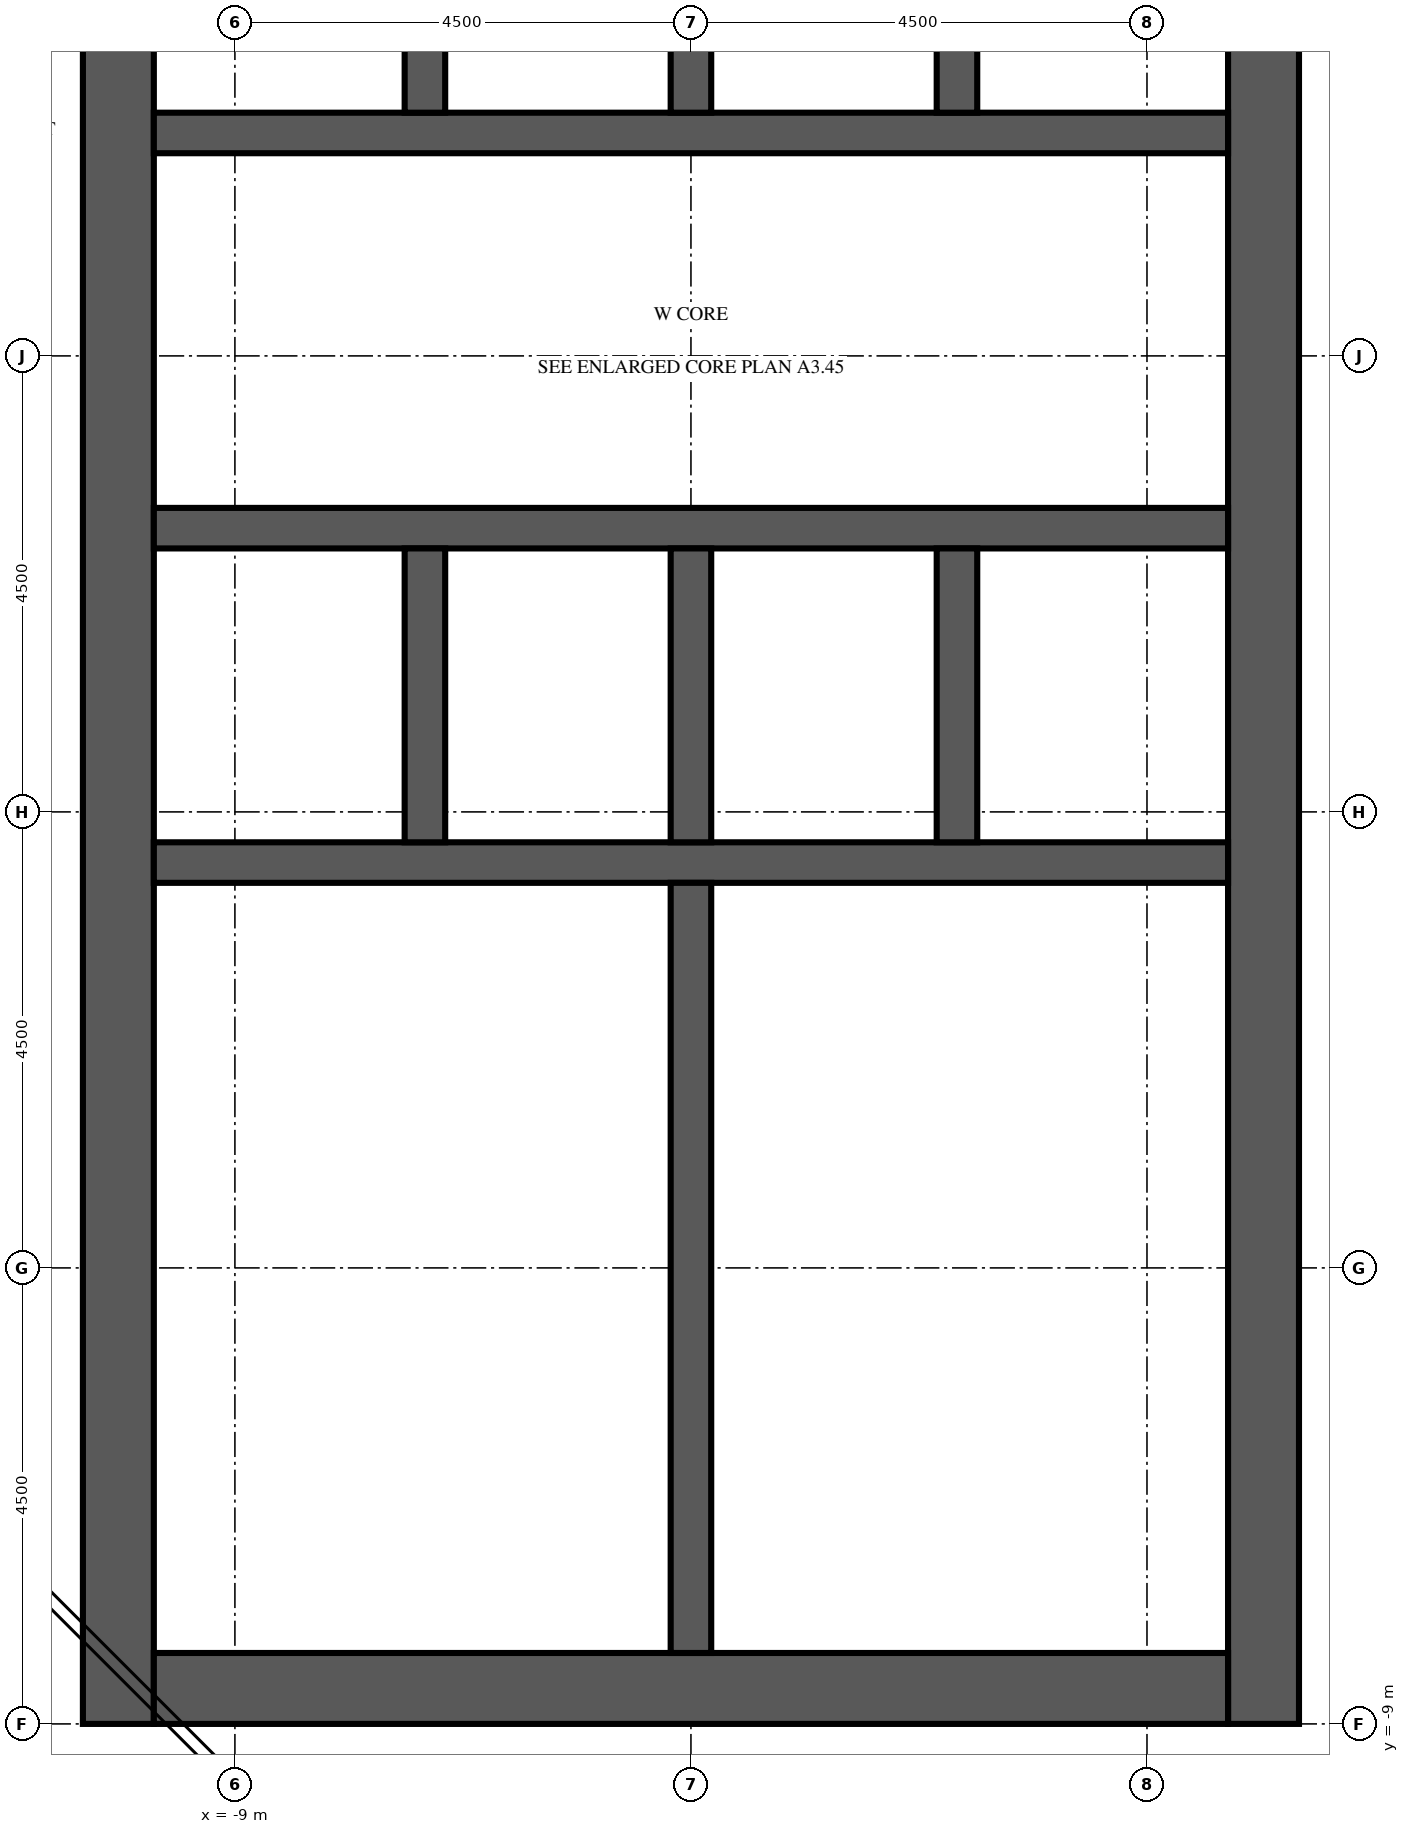
"""IFC4 building model, lengths in metres.
Left out: names, types, materials, properties, quantities, classifications, styles, units other than length and angle.
Written with IfcOpenShell. Run it as: python <this file> out.ifc"""

import sys

from ifc_helpers import new_model, si_unit, direction, frame, frame_2d, origin, place, context, subcontext, project, spatial, rectangle, extrude, element, fill, save


model = new_model("IFC4")
c1 = context("Model", 3, precision=1e-05, world=origin(), true_north=direction((0.0, 1.0)))
c2 = subcontext(c1, "Body", "Model", "MODEL_VIEW")
j1 = project(units=[si_unit("LENGTHUNIT", "METRE"), si_unit("PLANEANGLEUNIT", "RADIAN")], contexts=[c1])
p1 = place(None, origin())
s1 = spatial("IfcSite", under=j1, at=p1, CompositionType="ELEMENT")
p2 = place(p1, origin())
s2 = spatial("IfcBuilding", under=s1, at=p2, CompositionType="ELEMENT")
p3 = place(p2, frame((0.0, 0.0, 311.8)))
s3 = spatial("IfcBuildingStorey", under=s2, at=p3, CompositionType="ELEMENT", Elevation=311.8)
p4 = place(p3, frame((-10.15, -9.0, 0.0), z_axis=(0.0, 0.0, 1.0), x_axis=(0.0, 1.0, 0.0)))
e1 = element("IfcWall", 1, at=p4, inside=s3, PredefinedType="SHEAR", context=c2, shape_type="SweptSolid", body=[
    extrude(rectangle(XDim=27.5, YDim=0.7, at=frame_2d((13.75, 0.0))), origin(), (0.0, 0.0, 1.0), 4.8),
])
p5 = place(p4, frame((12.55, 0.0, 0.0)))
e2 = element("IfcOpeningElement", 2, at=p5, cuts=e1, PredefinedType="OPENING", context=c2, shape_type="SweptSolid", body=[
    extrude(rectangle(XDim=2.4, YDim=2.4, at=frame_2d((1.2, 1.2))), frame((0.0, 0.36, 0.0), z_axis=(0.0, -1.0, 0.0), x_axis=(1.0, 0.0, 0.0)), (0.0, 0.0, 1.0), 0.72),
])
p6 = place(p4, frame((6.825, 0.0, 0.0)))
e3 = element("IfcOpeningElement", 3, at=p6, cuts=e1, PredefinedType="OPENING", context=c2, shape_type="SweptSolid", body=[
    extrude(rectangle(XDim=1.2, YDim=2.1, at=frame_2d((0.6, 1.05))), frame((0.0, 0.36, 0.0), z_axis=(0.0, -1.0, 0.0), x_axis=(1.0, 0.0, 0.0)), (0.0, 0.0, 1.0), 0.72),
])
p7 = place(p4, frame((19.475, 0.0, 0.0)))
e4 = element("IfcOpeningElement", 4, at=p7, cuts=e1, PredefinedType="OPENING", context=c2, shape_type="SweptSolid", body=[
    extrude(rectangle(XDim=1.2, YDim=2.1, at=frame_2d((0.6, 1.05))), frame((0.0, 0.36, 0.0), z_axis=(0.0, -1.0, 0.0), x_axis=(1.0, 0.0, 0.0)), (0.0, 0.0, 1.0), 0.72),
])
p8 = place(p3, frame((1.15, -9.0, 0.0), z_axis=(0.0, 0.0, 1.0), x_axis=(0.0, 1.0, 0.0)))
e5 = element("IfcWall", 5, at=p8, inside=s3, PredefinedType="SHEAR", context=c2, shape_type="SweptSolid", body=[
    extrude(rectangle(XDim=27.5, YDim=0.7, at=frame_2d((13.75, 0.0))), origin(), (0.0, 0.0, 1.0), 4.8),
])
p9 = place(p8, frame((12.55, 0.0, 0.0)))
e6 = element("IfcOpeningElement", 6, at=p9, cuts=e5, PredefinedType="OPENING", context=c2, shape_type="SweptSolid", body=[
    extrude(rectangle(XDim=2.4, YDim=2.4, at=frame_2d((1.2, 1.2))), frame((0.0, 0.36, 0.0), z_axis=(0.0, -1.0, 0.0), x_axis=(1.0, 0.0, 0.0)), (0.0, 0.0, 1.0), 0.72),
])
p10 = place(p8, frame((5.42, 0.0, 0.0)))
e7 = element("IfcOpeningElement", 7, at=p10, cuts=e5, PredefinedType="OPENING", context=c2, shape_type="SweptSolid", body=[
    extrude(rectangle(XDim=1.2, YDim=2.1, at=frame_2d((0.6, 1.05))), frame((0.0, 0.36, 0.0), z_axis=(0.0, -1.0, 0.0), x_axis=(1.0, 0.0, 0.0)), (0.0, 0.0, 1.0), 0.72),
])
p11 = place(p8, frame((19.46, 0.0, 0.0)))
e8 = element("IfcOpeningElement", 8, at=p11, cuts=e5, PredefinedType="OPENING", context=c2, shape_type="SweptSolid", body=[
    extrude(rectangle(XDim=1.0, YDim=2.1, at=frame_2d((0.5, 1.05))), frame((0.0, 0.36, 0.0), z_axis=(0.0, -1.0, 0.0), x_axis=(1.0, 0.0, 0.0)), (0.0, 0.0, 1.0), 0.72),
])
p12 = place(p8, frame((21.17, 0.0, 0.0)))
e9 = element("IfcOpeningElement", 9, at=p12, cuts=e5, PredefinedType="OPENING", context=c2, shape_type="SweptSolid", body=[
    extrude(rectangle(XDim=1.0, YDim=2.1, at=frame_2d((0.5, 1.05))), frame((0.0, 0.36, 0.0), z_axis=(0.0, -1.0, 0.0), x_axis=(1.0, 0.0, 0.0)), (0.0, 0.0, 1.0), 0.72),
])
p13 = place(p8, frame((23.26, 0.0, 0.0)))
e10 = element("IfcOpeningElement", 10, at=p13, cuts=e5, PredefinedType="OPENING", context=c2, shape_type="SweptSolid", body=[
    extrude(rectangle(XDim=1.0, YDim=2.1, at=frame_2d((0.5, 1.05))), frame((0.0, 0.36, 0.0), z_axis=(0.0, -1.0, 0.0), x_axis=(1.0, 0.0, 0.0)), (0.0, 0.0, 1.0), 0.72),
])
p14 = place(p8, frame((25.35, 0.0, 0.0)))
e11 = element("IfcOpeningElement", 11, at=p14, cuts=e5, PredefinedType="OPENING", context=c2, shape_type="SweptSolid", body=[
    extrude(rectangle(XDim=1.0, YDim=2.1, at=frame_2d((0.5, 1.05))), frame((0.0, 0.36, 0.0), z_axis=(0.0, -1.0, 0.0), x_axis=(1.0, 0.0, 0.0)), (0.0, 0.0, 1.0), 0.72),
])
p15 = place(p3, frame((-9.8, -8.65, 0.0), z_axis=(0.0, 0.0, 1.0), x_axis=(1.0, 0.0, 0.0)))
e12 = element("IfcWall", 12, at=p15, inside=s3, PredefinedType="SHEAR", context=c2, shape_type="SweptSolid", body=[
    extrude(rectangle(XDim=10.6, YDim=0.7, at=frame_2d((5.3, 0.0))), origin(), (0.0, 0.0, 1.0), 4.8),
])
p16 = place(p3, frame((-9.8, -0.5, 0.0), z_axis=(0.0, 0.0, 1.0), x_axis=(1.0, 0.0, 0.0)))
e13 = element("IfcWall", 13, at=p16, inside=s3, PredefinedType="SHEAR", context=c2, shape_type="SweptSolid", body=[
    extrude(rectangle(XDim=10.6, YDim=0.4, at=frame_2d((5.3, 0.0))), origin(), (0.0, 0.0, 1.0), 4.8),
])
p17 = place(p3, frame((-9.8, 2.8, 0.0), z_axis=(0.0, 0.0, 1.0), x_axis=(1.0, 0.0, 0.0)))
e14 = element("IfcWall", 14, at=p17, inside=s3, PredefinedType="SHEAR", context=c2, shape_type="SweptSolid", body=[
    extrude(rectangle(XDim=10.6, YDim=0.4, at=frame_2d((5.3, 0.0))), origin(), (0.0, 0.0, 1.0), 4.8),
])
p18 = place(p17, frame((0.688, 0.0, 0.0)))
e15 = element("IfcOpeningElement", 15, at=p18, cuts=e14, PredefinedType="OPENING", context=c2, shape_type="SweptSolid", body=[
    extrude(rectangle(XDim=1.1, YDim=2.1, at=frame_2d((0.55, 1.05))), frame((0.0, 0.21, 0.0), z_axis=(0.0, -1.0, 0.0), x_axis=(1.0, 0.0, 0.0)), (0.0, 0.0, 1.0), 0.42),
])
p19 = place(p17, frame((3.438, 0.0, 0.0)))
e16 = element("IfcOpeningElement", 16, at=p19, cuts=e14, PredefinedType="OPENING", context=c2, shape_type="SweptSolid", body=[
    extrude(rectangle(XDim=1.1, YDim=2.1, at=frame_2d((0.55, 1.05))), frame((0.0, 0.21, 0.0), z_axis=(0.0, -1.0, 0.0), x_axis=(1.0, 0.0, 0.0)), (0.0, 0.0, 1.0), 0.42),
])
p20 = place(p17, frame((6.113, 0.0, 0.0)))
e17 = element("IfcOpeningElement", 17, at=p20, cuts=e14, PredefinedType="OPENING", context=c2, shape_type="SweptSolid", body=[
    extrude(rectangle(XDim=1.0, YDim=2.1, at=frame_2d((0.5, 1.05))), frame((0.0, 0.21, 0.0), z_axis=(0.0, -1.0, 0.0), x_axis=(1.0, 0.0, 0.0)), (0.0, 0.0, 1.0), 0.42),
])
p21 = place(p17, frame((8.863, 0.0, 0.0)))
e18 = element("IfcOpeningElement", 18, at=p21, cuts=e14, PredefinedType="OPENING", context=c2, shape_type="SweptSolid", body=[
    extrude(rectangle(XDim=1.0, YDim=2.1, at=frame_2d((0.5, 1.05))), frame((0.0, 0.21, 0.0), z_axis=(0.0, -1.0, 0.0), x_axis=(1.0, 0.0, 0.0)), (0.0, 0.0, 1.0), 0.42),
])
p22 = place(p3, frame((-9.8, 6.7, 0.0), z_axis=(0.0, 0.0, 1.0), x_axis=(1.0, 0.0, 0.0)))
e19 = element("IfcWall", 19, at=p22, inside=s3, PredefinedType="SHEAR", context=c2, shape_type="SweptSolid", body=[
    extrude(rectangle(XDim=10.6, YDim=0.4, at=frame_2d((5.3, 0.0))), origin(), (0.0, 0.0, 1.0), 4.8),
])
p23 = place(p22, frame((0.738, 0.0, 0.0)))
e20 = element("IfcOpeningElement", 20, at=p23, cuts=e19, PredefinedType="OPENING", context=c2, shape_type="SweptSolid", body=[
    extrude(rectangle(XDim=1.0, YDim=2.1, at=frame_2d((0.5, 1.05))), frame((0.0, 0.21, 0.0), z_axis=(0.0, -1.0, 0.0), x_axis=(1.0, 0.0, 0.0)), (0.0, 0.0, 1.0), 0.42),
])
p24 = place(p22, frame((3.488, 0.0, 0.0)))
e21 = element("IfcOpeningElement", 21, at=p24, cuts=e19, PredefinedType="OPENING", context=c2, shape_type="SweptSolid", body=[
    extrude(rectangle(XDim=1.0, YDim=2.1, at=frame_2d((0.5, 1.05))), frame((0.0, 0.21, 0.0), z_axis=(0.0, -1.0, 0.0), x_axis=(1.0, 0.0, 0.0)), (0.0, 0.0, 1.0), 0.42),
])
p25 = place(p22, frame((6.113, 0.0, 0.0)))
e22 = element("IfcOpeningElement", 22, at=p25, cuts=e19, PredefinedType="OPENING", context=c2, shape_type="SweptSolid", body=[
    extrude(rectangle(XDim=1.0, YDim=2.1, at=frame_2d((0.5, 1.05))), frame((0.0, 0.21, 0.0), z_axis=(0.0, -1.0, 0.0), x_axis=(1.0, 0.0, 0.0)), (0.0, 0.0, 1.0), 0.42),
])
p26 = place(p22, frame((8.863, 0.0, 0.0)))
e23 = element("IfcOpeningElement", 23, at=p26, cuts=e19, PredefinedType="OPENING", context=c2, shape_type="SweptSolid", body=[
    extrude(rectangle(XDim=1.0, YDim=2.1, at=frame_2d((0.5, 1.05))), frame((0.0, 0.21, 0.0), z_axis=(0.0, -1.0, 0.0), x_axis=(1.0, 0.0, 0.0)), (0.0, 0.0, 1.0), 0.42),
])
for number, where, z_axis, x_axis in (
    (24, (-7.125, -0.3, 0.0), (0.0, 0.0, 1.0), (0.0, 1.0, 0.0)),
    (25, (-7.125, 6.9, 0.0), (0.0, 0.0, 1.0), (0.0, 1.0, 0.0)),
    (26, (-4.5, -0.3, 0.0), (0.0, 0.0, 1.0), (0.0, 1.0, 0.0)),
    (27, (-4.5, 6.9, 0.0), (0.0, 0.0, 1.0), (0.0, 1.0, 0.0)),
    (28, (-1.875, -0.3, 0.0), (0.0, 0.0, 1.0), (0.0, 1.0, 0.0)),
    (29, (-1.875, 6.9, 0.0), (0.0, 0.0, 1.0), (0.0, 1.0, 0.0)),
):
    element("IfcWall", number, at=place(p3, frame(where, z_axis=z_axis, x_axis=x_axis)), inside=s3, PredefinedType="SHEAR", context=c2, shape_type="SweptSolid", body=[
        extrude(rectangle(XDim=2.9, YDim=0.4, at=frame_2d((1.45, 0.0))), origin(), (0.0, 0.0, 1.0), 4.8),
    ])
p27 = place(p3, frame((-4.5, -8.3, 0.0), z_axis=(0.0, 0.0, 1.0), x_axis=(0.0, 1.0, 0.0)))
e30 = element("IfcWall", 30, at=p27, inside=s3, PredefinedType="SHEAR", context=c2, shape_type="SweptSolid", body=[
    extrude(rectangle(XDim=7.6, YDim=0.4, at=frame_2d((3.8, 0.0))), origin(), (0.0, 0.0, 1.0), 4.8),
])
p28 = place(p3, frame((-0.7, -5.26, 0.0), z_axis=(0.0, 0.0, 1.0), x_axis=(1.0, 0.0, 0.0)))
e31 = element("IfcWall", 31, at=p28, inside=s3, PredefinedType="PARTITIONING", context=c2, shape_type="SweptSolid", body=[
    extrude(rectangle(XDim=1.5, YDim=0.1, at=frame_2d((0.75, 0.0))), origin(), (0.0, 0.0, 1.0), 4.2),
])
p29 = place(p28, frame((0.25, 0.0, 0.0)))
e32 = element("IfcOpeningElement", 32, at=p29, cuts=e31, PredefinedType="OPENING", context=c2, shape_type="SweptSolid", body=[
    extrude(rectangle(XDim=1.0, YDim=2.1, at=frame_2d((0.5, 1.05))), frame((0.0, 0.06, 0.0), z_axis=(0.0, -1.0, 0.0), x_axis=(1.0, 0.0, 0.0)), (0.0, 0.0, 1.0), 0.12),
])
p30 = place(p3, frame((-0.7, -5.26, 0.0), z_axis=(0.0, 0.0, 1.0), x_axis=(0.0, 1.0, 0.0)))
e33 = element("IfcWall", 33, at=p30, inside=s3, PredefinedType="PARTITIONING", context=c2, shape_type="SweptSolid", body=[
    extrude(rectangle(XDim=2.28, YDim=0.1, at=frame_2d((1.14, 0.0))), origin(), (0.0, 0.0, 1.0), 4.2),
])
p31 = place(p30, frame((0.64, 0.0, 0.0)))
e34 = element("IfcOpeningElement", 34, at=p31, cuts=e33, PredefinedType="OPENING", context=c2, shape_type="SweptSolid", body=[
    extrude(rectangle(XDim=1.0, YDim=2.1, at=frame_2d((0.5, 1.05))), frame((0.0, 0.06, 0.0), z_axis=(0.0, -1.0, 0.0), x_axis=(1.0, 0.0, 0.0)), (0.0, 0.0, 1.0), 0.12),
])
p32 = place(p3, frame((-0.7, -2.98, 0.0), z_axis=(0.0, 0.0, 1.0), x_axis=(0.0, 1.0, 0.0)))
e35 = element("IfcWall", 35, at=p32, inside=s3, PredefinedType="PARTITIONING", context=c2, shape_type="SweptSolid", body=[
    extrude(rectangle(XDim=2.28, YDim=0.1, at=frame_2d((1.14, 0.0))), origin(), (0.0, 0.0, 1.0), 4.2),
])
p33 = place(p32, frame((0.64, 0.0, 0.0)))
e36 = element("IfcOpeningElement", 36, at=p33, cuts=e35, PredefinedType="OPENING", context=c2, shape_type="SweptSolid", body=[
    extrude(rectangle(XDim=1.0, YDim=2.1, at=frame_2d((0.5, 1.05))), frame((0.0, 0.06, 0.0), z_axis=(0.0, -1.0, 0.0), x_axis=(1.0, 0.0, 0.0)), (0.0, 0.0, 1.0), 0.12),
])
for number, where, z_axis, x_axis in (
    (37, (-4.3, -5.26, 0.0), (0.0, 0.0, 1.0), (1.0, 0.0, 0.0)),
    (38, (-4.3, -2.98, 0.0), (0.0, 0.0, 1.0), (1.0, 0.0, 0.0)),
):
    element("IfcWall", number, at=place(p3, frame(where, z_axis=z_axis, x_axis=x_axis)), inside=s3, PredefinedType="PARTITIONING", context=c2, shape_type="SweptSolid", body=[
        extrude(rectangle(XDim=3.6, YDim=0.1, at=frame_2d((1.8, 0.0))), origin(), (0.0, 0.0, 1.0), 4.2),
    ])
p34 = place(p18, origin())
e39 = element("IfcDoor", 39, at=p34, inside=s3, OperationType="DOUBLE_DOOR_SLIDING", PredefinedType="DOOR", context=c2, shape_type="SweptSolid", body=[
    extrude(rectangle(XDim=1.1, YDim=2.1, at=frame_2d((0.55, 1.05))), frame((0.0, 0.025, 0.0), z_axis=(0.0, -1.0, 0.0), x_axis=(1.0, 0.0, 0.0)), (0.0, 0.0, 1.0), 0.05),
])
fill(e15, e39)
p35 = place(p19, origin())
e40 = element("IfcDoor", 40, at=p35, inside=s3, OperationType="DOUBLE_DOOR_SLIDING", PredefinedType="DOOR", context=c2, shape_type="SweptSolid", body=[
    extrude(rectangle(XDim=1.1, YDim=2.1, at=frame_2d((0.55, 1.05))), frame((0.0, 0.025, 0.0), z_axis=(0.0, -1.0, 0.0), x_axis=(1.0, 0.0, 0.0)), (0.0, 0.0, 1.0), 0.05),
])
fill(e16, e40)
p36 = place(p5, origin())
e41 = element("IfcDoor", 41, at=p36, inside=s3, OperationType="DOUBLE_DOOR_DOUBLE_SWING", PredefinedType="DOOR", context=c2, shape_type="SweptSolid", body=[
    extrude(rectangle(XDim=2.4, YDim=2.4, at=frame_2d((1.2, 1.2))), frame((0.0, 0.025, 0.0), z_axis=(0.0, -1.0, 0.0), x_axis=(1.0, 0.0, 0.0)), (0.0, 0.0, 1.0), 0.05),
])
fill(e2, e41)
p37 = place(p9, origin())
e42 = element("IfcDoor", 42, at=p37, inside=s3, OperationType="DOUBLE_DOOR_DOUBLE_SWING", PredefinedType="DOOR", context=c2, shape_type="SweptSolid", body=[
    extrude(rectangle(XDim=2.4, YDim=2.4, at=frame_2d((1.2, 1.2))), frame((0.0, 0.025, 0.0), z_axis=(0.0, -1.0, 0.0), x_axis=(1.0, 0.0, 0.0)), (0.0, 0.0, 1.0), 0.05),
])
fill(e6, e42)
p38 = place(p6, origin())
e43 = element("IfcDoor", 43, at=p38, inside=s3, OperationType="SINGLE_SWING_LEFT", PredefinedType="DOOR", context=c2, shape_type="SweptSolid", body=[
    extrude(rectangle(XDim=1.2, YDim=2.1, at=frame_2d((0.6, 1.05))), frame((0.0, 0.025, 0.0), z_axis=(0.0, -1.0, 0.0), x_axis=(1.0, 0.0, 0.0)), (0.0, 0.0, 1.0), 0.05),
])
fill(e3, e43)
p39 = place(p20, origin())
e44 = element("IfcDoor", 44, at=p39, inside=s3, OperationType="SINGLE_SWING_LEFT", PredefinedType="DOOR", context=c2, shape_type="SweptSolid", body=[
    extrude(rectangle(XDim=1.0, YDim=2.1, at=frame_2d((0.5, 1.05))), frame((0.0, 0.025, 0.0), z_axis=(0.0, -1.0, 0.0), x_axis=(1.0, 0.0, 0.0)), (0.0, 0.0, 1.0), 0.05),
])
fill(e17, e44)
p40 = place(p21, origin())
e45 = element("IfcDoor", 45, at=p40, inside=s3, OperationType="SINGLE_SWING_RIGHT", PredefinedType="DOOR", context=c2, shape_type="SweptSolid", body=[
    extrude(rectangle(XDim=1.0, YDim=2.1, at=frame_2d((0.5, 1.05))), frame((0.0, 0.025, 0.0), z_axis=(0.0, -1.0, 0.0), x_axis=(1.0, 0.0, 0.0)), (0.0, 0.0, 1.0), 0.05),
])
fill(e18, e45)
p41 = place(p23, origin())
e46 = element("IfcDoor", 46, at=p41, inside=s3, OperationType="SINGLE_SWING_LEFT", PredefinedType="DOOR", context=c2, shape_type="SweptSolid", body=[
    extrude(rectangle(XDim=1.0, YDim=2.1, at=frame_2d((0.5, 1.05))), frame((0.0, 0.025, 0.0), z_axis=(0.0, -1.0, 0.0), x_axis=(1.0, 0.0, 0.0)), (0.0, 0.0, 1.0), 0.05),
])
fill(e20, e46)
p42 = place(p24, origin())
e47 = element("IfcDoor", 47, at=p42, inside=s3, OperationType="SINGLE_SWING_RIGHT", PredefinedType="DOOR", context=c2, shape_type="SweptSolid", body=[
    extrude(rectangle(XDim=1.0, YDim=2.1, at=frame_2d((0.5, 1.05))), frame((0.0, 0.025, 0.0), z_axis=(0.0, -1.0, 0.0), x_axis=(1.0, 0.0, 0.0)), (0.0, 0.0, 1.0), 0.05),
])
fill(e21, e47)
p43 = place(p25, origin())
e48 = element("IfcDoor", 48, at=p43, inside=s3, OperationType="SINGLE_SWING_LEFT", PredefinedType="DOOR", context=c2, shape_type="SweptSolid", body=[
    extrude(rectangle(XDim=1.0, YDim=2.1, at=frame_2d((0.5, 1.05))), frame((0.0, 0.025, 0.0), z_axis=(0.0, -1.0, 0.0), x_axis=(1.0, 0.0, 0.0)), (0.0, 0.0, 1.0), 0.05),
])
fill(e22, e48)
p44 = place(p26, origin())
e49 = element("IfcDoor", 49, at=p44, inside=s3, OperationType="SINGLE_SWING_RIGHT", PredefinedType="DOOR", context=c2, shape_type="SweptSolid", body=[
    extrude(rectangle(XDim=1.0, YDim=2.1, at=frame_2d((0.5, 1.05))), frame((0.0, 0.025, 0.0), z_axis=(0.0, -1.0, 0.0), x_axis=(1.0, 0.0, 0.0)), (0.0, 0.0, 1.0), 0.05),
])
fill(e23, e49)
p45 = place(p10, origin())
e50 = element("IfcDoor", 50, at=p45, inside=s3, OperationType="SINGLE_SWING_LEFT", PredefinedType="DOOR", context=c2, shape_type="SweptSolid", body=[
    extrude(rectangle(XDim=1.2, YDim=2.1, at=frame_2d((0.6, 1.05))), frame((0.0, 0.325, 0.0), z_axis=(0.0, -1.0, 0.0), x_axis=(1.0, 0.0, 0.0)), (0.0, 0.0, 1.0), 0.05),
])
fill(e7, e50)
p46 = place(p29, origin())
e51 = element("IfcDoor", 51, at=p46, inside=s3, OperationType="SINGLE_SWING_RIGHT", PredefinedType="DOOR", context=c2, shape_type="SweptSolid", body=[
    extrude(rectangle(XDim=1.0, YDim=2.1, at=frame_2d((0.5, 1.05))), frame((0.0, 0.025, 0.0), z_axis=(0.0, -1.0, 0.0), x_axis=(1.0, 0.0, 0.0)), (0.0, 0.0, 1.0), 0.05),
])
fill(e32, e51)
p47 = place(p31, origin())
e52 = element("IfcDoor", 52, at=p47, inside=s3, OperationType="SINGLE_SWING_LEFT", PredefinedType="DOOR", context=c2, shape_type="SweptSolid", body=[
    extrude(rectangle(XDim=1.0, YDim=2.1, at=frame_2d((0.5, 1.05))), frame((0.0, 0.025, 0.0), z_axis=(0.0, -1.0, 0.0), x_axis=(1.0, 0.0, 0.0)), (0.0, 0.0, 1.0), 0.05),
])
fill(e34, e52)
p48 = place(p33, origin())
e53 = element("IfcDoor", 53, at=p48, inside=s3, OperationType="SINGLE_SWING_RIGHT", PredefinedType="DOOR", context=c2, shape_type="SweptSolid", body=[
    extrude(rectangle(XDim=1.0, YDim=2.1, at=frame_2d((0.5, 1.05))), frame((0.0, 0.025, 0.0), z_axis=(0.0, -1.0, 0.0), x_axis=(1.0, 0.0, 0.0)), (0.0, 0.0, 1.0), 0.05),
])
fill(e36, e53)
save(model, sys.argv[1])
